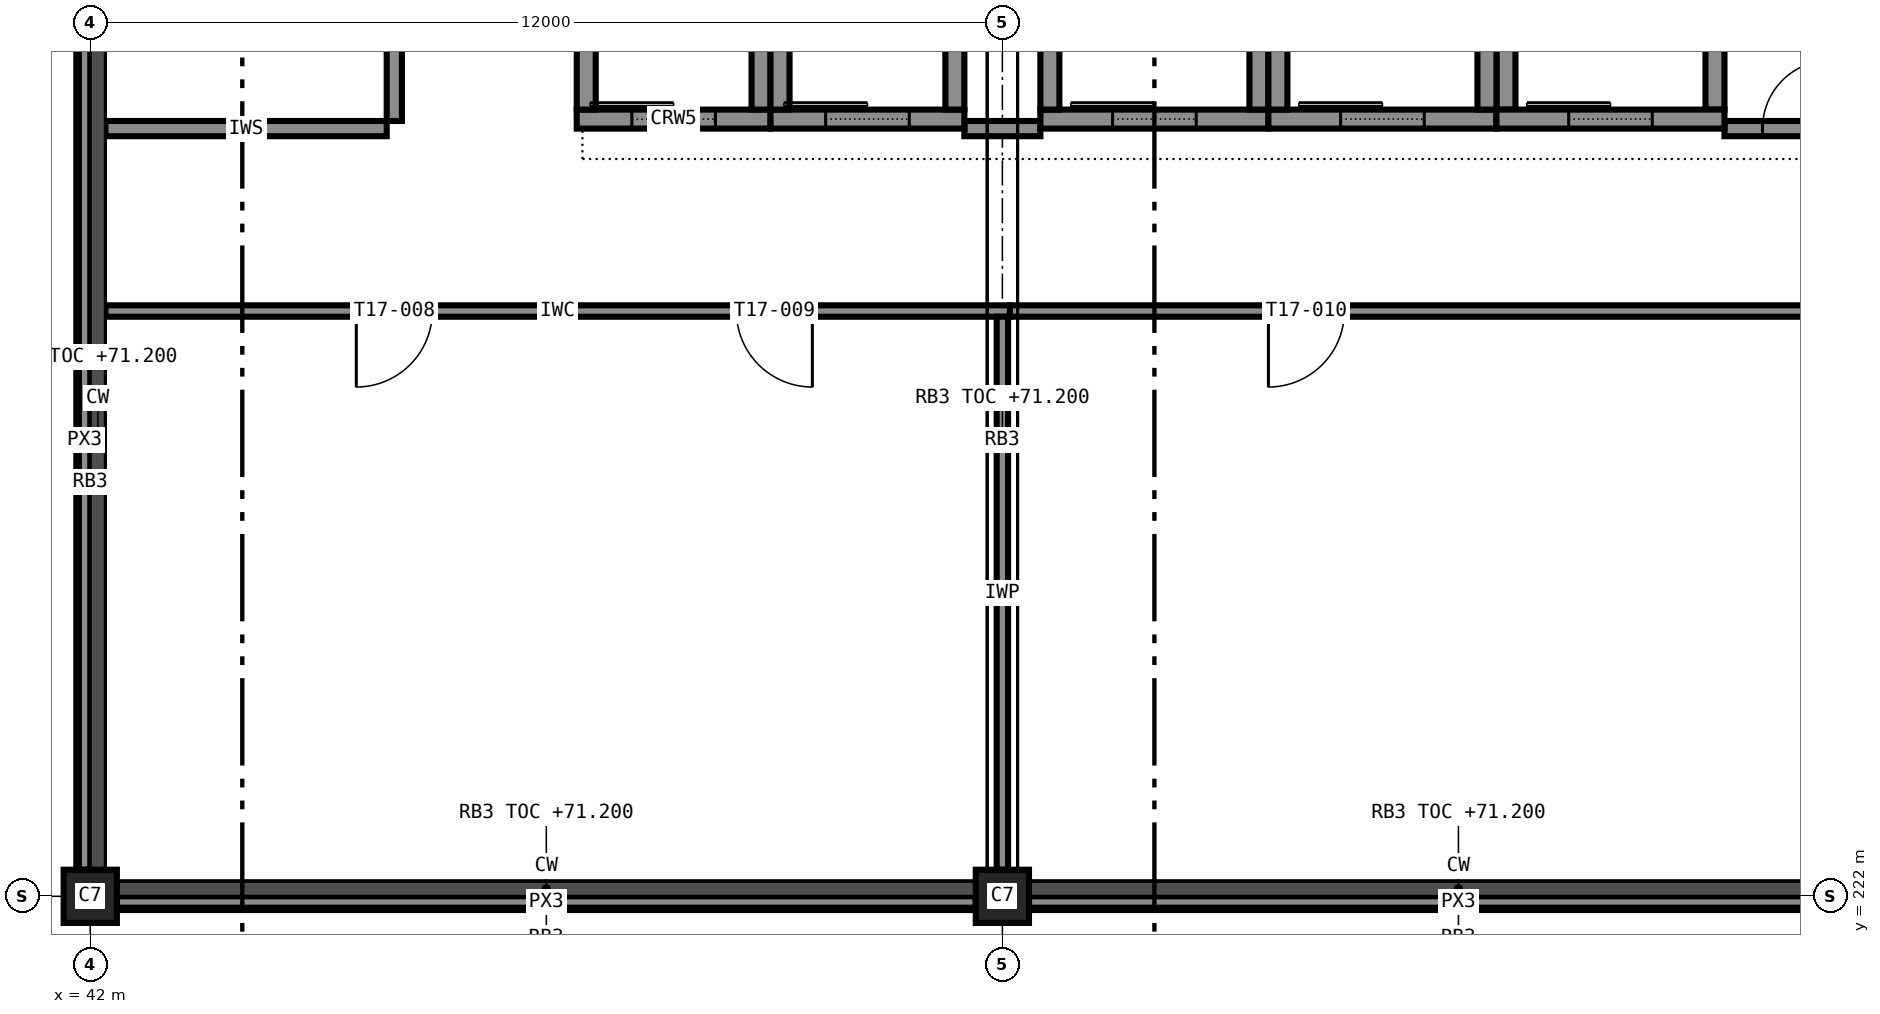
"""IFC4 building model, lengths in metres.
Left out: names, types, materials, properties, quantities, classifications, styles, units other than length and angle.
Written with IfcOpenShell. Run it as: python <this file> out.ifc"""

import sys

from ifc_helpers import new_model, si_unit, direction, frame, frame_2d, origin, origin_2d, place, context, subcontext, project, spatial, rectangle, extrude, element, fill, save


model = new_model("IFC4")
c1 = context("Model", 3, precision=1e-05, world=origin(), true_north=direction((0.0, 1.0)))
c2 = subcontext(c1, "Body", "Model", "MODEL_VIEW")
j1 = project(units=[si_unit("LENGTHUNIT", "METRE"), si_unit("PLANEANGLEUNIT", "RADIAN")], contexts=[c1])
p1 = place(None, origin())
s1 = spatial("IfcSite", under=j1, at=p1, CompositionType="ELEMENT")
p2 = place(p1, origin())
s2 = spatial("IfcBuilding", under=s1, at=p2, CompositionType="ELEMENT")
p3 = place(p2, frame((0.0, 0.0, 67.8)))
s3 = spatial("IfcBuildingStorey", under=s2, at=p3, CompositionType="ELEMENT", Elevation=67.8)
for number, where, z_axis, x_axis in (
    (1, (42.0, 222.0, 0.0), (0.0, 0.0, 1.0), (1.0, 0.0, 0.0)),
    (2, (54.0, 222.0, 0.0), (0.0, 0.0, 1.0), (1.0, 0.0, 0.0)),
):
    element("IfcColumn", number, at=place(p3, frame(where, z_axis=z_axis, x_axis=x_axis)), inside=s3, PredefinedType="COLUMN", context=c2, shape_type="SweptSolid", body=[
        extrude(rectangle(XDim=0.7, YDim=0.7, at=origin_2d()), origin(), (0.0, 0.0, 1.0), 3.6),
    ])
p4 = place(p3, frame((54.5, 232.225, 0.0), z_axis=(0.0, 0.0, 1.0), x_axis=(1.0, 0.0, 0.0)))
e3 = element("IfcWall", 3, at=p4, inside=s3, PredefinedType="SHEAR", context=c2, shape_type="SweptSolid", body=[
    extrude(rectangle(XDim=3.0, YDim=0.25, at=frame_2d((1.5, 0.0))), origin(), (0.0, 0.0, 1.0), 3.6),
])
p5 = place(p4, frame((0.95, 0.0, 0.0)))
e4 = element("IfcOpeningElement", 4, at=p5, cuts=e3, PredefinedType="OPENING", context=c2, shape_type="SweptSolid", body=[
    extrude(rectangle(XDim=1.1, YDim=2.1, at=frame_2d((0.55, 1.05))), frame((0.0, 0.135, 0.0), z_axis=(0.0, -1.0, 0.0), x_axis=(1.0, 0.0, 0.0)), (0.0, 0.0, 1.0), 0.27),
])
for number, where, z_axis, x_axis in (
    (5, (54.625, 232.35, 0.0), (0.0, 0.0, 1.0), (0.0, 1.0, 0.0)),
    (6, (57.375, 232.35, 0.0), (0.0, 0.0, 1.0), (0.0, 1.0, 0.0)),
):
    element("IfcWall", number, at=place(p3, frame(where, z_axis=z_axis, x_axis=x_axis)), inside=s3, PredefinedType="SHEAR", context=c2, shape_type="SweptSolid", body=[
        extrude(rectangle(XDim=3.3, YDim=0.25, at=frame_2d((1.65, 0.0))), origin(), (0.0, 0.0, 1.0), 3.6),
    ])
p6 = place(p3, frame((57.5, 232.225, 0.0), z_axis=(0.0, 0.0, 1.0), x_axis=(1.0, 0.0, 0.0)))
e7 = element("IfcWall", 7, at=p6, inside=s3, PredefinedType="SHEAR", context=c2, shape_type="SweptSolid", body=[
    extrude(rectangle(XDim=3.0, YDim=0.25, at=frame_2d((1.5, 0.0))), origin(), (0.0, 0.0, 1.0), 3.6),
])
p7 = place(p6, frame((0.95, 0.0, 0.0)))
e8 = element("IfcOpeningElement", 8, at=p7, cuts=e7, PredefinedType="OPENING", context=c2, shape_type="SweptSolid", body=[
    extrude(rectangle(XDim=1.1, YDim=2.1, at=frame_2d((0.55, 1.05))), frame((0.0, 0.135, 0.0), z_axis=(0.0, -1.0, 0.0), x_axis=(1.0, 0.0, 0.0)), (0.0, 0.0, 1.0), 0.27),
])
for number, where, z_axis, x_axis in (
    (9, (57.625, 232.35, 0.0), (0.0, 0.0, 1.0), (0.0, 1.0, 0.0)),
    (10, (60.375, 232.35, 0.0), (0.0, 0.0, 1.0), (0.0, 1.0, 0.0)),
):
    element("IfcWall", number, at=place(p3, frame(where, z_axis=z_axis, x_axis=x_axis)), inside=s3, PredefinedType="SHEAR", context=c2, shape_type="SweptSolid", body=[
        extrude(rectangle(XDim=3.3, YDim=0.25, at=frame_2d((1.65, 0.0))), origin(), (0.0, 0.0, 1.0), 3.6),
    ])
p8 = place(p3, frame((60.5, 232.225, 0.0), z_axis=(0.0, 0.0, 1.0), x_axis=(1.0, 0.0, 0.0)))
e11 = element("IfcWall", 11, at=p8, inside=s3, PredefinedType="SHEAR", context=c2, shape_type="SweptSolid", body=[
    extrude(rectangle(XDim=3.0, YDim=0.25, at=frame_2d((1.5, 0.0))), origin(), (0.0, 0.0, 1.0), 3.6),
])
p9 = place(p8, frame((0.95, 0.0, 0.0)))
e12 = element("IfcOpeningElement", 12, at=p9, cuts=e11, PredefinedType="OPENING", context=c2, shape_type="SweptSolid", body=[
    extrude(rectangle(XDim=1.1, YDim=2.1, at=frame_2d((0.55, 1.05))), frame((0.0, 0.135, 0.0), z_axis=(0.0, -1.0, 0.0), x_axis=(1.0, 0.0, 0.0)), (0.0, 0.0, 1.0), 0.27),
])
for number, where, z_axis, x_axis in (
    (13, (60.625, 232.35, 0.0), (0.0, 0.0, 1.0), (0.0, 1.0, 0.0)),
    (14, (63.375, 232.35, 0.0), (0.0, 0.0, 1.0), (0.0, 1.0, 0.0)),
):
    element("IfcWall", number, at=place(p3, frame(where, z_axis=z_axis, x_axis=x_axis)), inside=s3, PredefinedType="SHEAR", context=c2, shape_type="SweptSolid", body=[
        extrude(rectangle(XDim=3.3, YDim=0.25, at=frame_2d((1.65, 0.0))), origin(), (0.0, 0.0, 1.0), 3.6),
    ])
p10 = place(p3, frame((48.4, 232.225, 0.0), z_axis=(0.0, 0.0, 1.0), x_axis=(1.0, 0.0, 0.0)))
e15 = element("IfcWall", 15, at=p10, inside=s3, PredefinedType="SHEAR", context=c2, shape_type="SweptSolid", body=[
    extrude(rectangle(XDim=2.55, YDim=0.25, at=frame_2d((1.275, 0.0))), origin(), (0.0, 0.0, 1.0), 3.6),
])
p11 = place(p10, frame((0.725, 0.0, 0.0)))
e16 = element("IfcOpeningElement", 16, at=p11, cuts=e15, PredefinedType="OPENING", context=c2, shape_type="SweptSolid", body=[
    extrude(rectangle(XDim=1.1, YDim=2.1, at=frame_2d((0.55, 1.05))), frame((0.0, 0.135, 0.0), z_axis=(0.0, -1.0, 0.0), x_axis=(1.0, 0.0, 0.0)), (0.0, 0.0, 1.0), 0.27),
])
for number, where, z_axis, x_axis in (
    (17, (48.525, 232.35, 0.0), (0.0, 0.0, 1.0), (0.0, 1.0, 0.0)),
    (18, (50.825, 232.35, 0.0), (0.0, 0.0, 1.0), (0.0, 1.0, 0.0)),
):
    element("IfcWall", number, at=place(p3, frame(where, z_axis=z_axis, x_axis=x_axis)), inside=s3, PredefinedType="SHEAR", context=c2, shape_type="SweptSolid", body=[
        extrude(rectangle(XDim=3.3, YDim=0.25, at=frame_2d((1.65, 0.0))), origin(), (0.0, 0.0, 1.0), 3.6),
    ])
p12 = place(p3, frame((50.95, 232.225, 0.0), z_axis=(0.0, 0.0, 1.0), x_axis=(1.0, 0.0, 0.0)))
e19 = element("IfcWall", 19, at=p12, inside=s3, PredefinedType="SHEAR", context=c2, shape_type="SweptSolid", body=[
    extrude(rectangle(XDim=2.55, YDim=0.25, at=frame_2d((1.275, 0.0))), origin(), (0.0, 0.0, 1.0), 3.6),
])
p13 = place(p12, frame((0.725, 0.0, 0.0)))
e20 = element("IfcOpeningElement", 20, at=p13, cuts=e19, PredefinedType="OPENING", context=c2, shape_type="SweptSolid", body=[
    extrude(rectangle(XDim=1.1, YDim=2.1, at=frame_2d((0.55, 1.05))), frame((0.0, 0.135, 0.0), z_axis=(0.0, -1.0, 0.0), x_axis=(1.0, 0.0, 0.0)), (0.0, 0.0, 1.0), 0.27),
])
for number, where, z_axis, x_axis in (
    (21, (51.075, 232.35, 0.0), (0.0, 0.0, 1.0), (0.0, 1.0, 0.0)),
    (22, (53.375, 232.35, 0.0), (0.0, 0.0, 1.0), (0.0, 1.0, 0.0)),
):
    element("IfcWall", number, at=place(p3, frame(where, z_axis=z_axis, x_axis=x_axis)), inside=s3, PredefinedType="SHEAR", context=c2, shape_type="SweptSolid", body=[
        extrude(rectangle(XDim=3.3, YDim=0.25, at=frame_2d((1.65, 0.0))), origin(), (0.0, 0.0, 1.0), 3.6),
    ])
for number, where, z_axis, x_axis in (
    (23, (42.35, 221.925, 3.4), (0.0, 0.0, 1.0), (1.0, 0.0, 0.0)),
    (24, (54.35, 221.925, 3.4), (0.0, 0.0, 1.0), (1.0, 0.0, 0.0)),
    (25, (41.925, 233.65, 3.4), (0.0, 0.0, 1.0), (0.0, -1.0, 0.0)),
):
    element("IfcWall", number, at=place(p3, frame(where, z_axis=z_axis, x_axis=x_axis)), inside=s3, PredefinedType="STANDARD", context=c2, shape_type="SweptSolid", body=[
        extrude(rectangle(XDim=11.3, YDim=0.15, at=frame_2d((5.65, 0.0))), origin(), (0.0, 0.0, 1.0), 0.2),
    ])
p14 = place(p3, frame((42.2, 232.1, 0.0), z_axis=(0.0, 0.0, 1.0), x_axis=(1.0, 0.0, 0.0)))
e26 = element("IfcWall", 26, at=p14, inside=s3, PredefinedType="PARTITIONING", context=c2, shape_type="SweptSolid", body=[
    extrude(rectangle(XDim=3.7, YDim=0.2, at=frame_2d((1.85, 0.0))), origin(), (0.0, 0.0, 1.0), 3.4),
])
p15 = place(p3, frame((53.5, 232.1, 0.0), z_axis=(0.0, 0.0, 1.0), x_axis=(1.0, 0.0, 0.0)))
e27 = element("IfcWall", 27, at=p15, inside=s3, PredefinedType="PARTITIONING", context=c2, shape_type="SweptSolid", body=[
    extrude(rectangle(XDim=1.0, YDim=0.2, at=frame_2d((0.5, 0.0))), origin(), (0.0, 0.0, 1.0), 3.4),
])
p16 = place(p3, frame((63.5, 232.1, 0.0), z_axis=(0.0, 0.0, 1.0), x_axis=(1.0, 0.0, 0.0)))
e28 = element("IfcWall", 28, at=p16, inside=s3, PredefinedType="PARTITIONING", context=c2, shape_type="SweptSolid", body=[
    extrude(rectangle(XDim=1.9, YDim=0.2, at=frame_2d((0.95, 0.0))), origin(), (0.0, 0.0, 1.0), 3.4),
])
p17 = place(p16, frame((0.5, 0.0, 0.0)))
e29 = element("IfcOpeningElement", 29, at=p17, cuts=e28, PredefinedType="OPENING", context=c2, shape_type="SweptSolid", body=[
    extrude(rectangle(XDim=0.9, YDim=2.1, at=frame_2d((0.45, 1.05))), frame((0.0, 0.11, 0.0), z_axis=(0.0, -1.0, 0.0), x_axis=(1.0, 0.0, 0.0)), (0.0, 0.0, 1.0), 0.22),
])
p18 = place(p3, frame((46.0, 232.2, 0.0), z_axis=(0.0, 0.0, 1.0), x_axis=(0.0, 1.0, 0.0)))
e30 = element("IfcWall", 30, at=p18, inside=s3, PredefinedType="PARTITIONING", context=c2, shape_type="SweptSolid", body=[
    extrude(rectangle(XDim=3.6, YDim=0.2, at=frame_2d((1.8, 0.0))), origin(), (0.0, 0.0, 1.0), 3.4),
])
p19 = place(p18, frame((1.35, 0.0, 0.0)))
e31 = element("IfcOpeningElement", 31, at=p19, cuts=e30, PredefinedType="OPENING", context=c2, shape_type="SweptSolid", body=[
    extrude(rectangle(XDim=0.9, YDim=2.1, at=frame_2d((0.45, 1.05))), frame((0.0, 0.11, 0.0), z_axis=(0.0, -1.0, 0.0), x_axis=(1.0, 0.0, 0.0)), (0.0, 0.0, 1.0), 0.22),
])
p20 = place(p3, frame((54.1, 229.7, 0.0), z_axis=(0.0, 0.0, 1.0), x_axis=(-1.0, 0.0, 0.0)))
e32 = element("IfcWall", 32, at=p20, inside=s3, PredefinedType="PARTITIONING", context=c2, shape_type="SweptSolid", body=[
    extrude(rectangle(XDim=11.9, YDim=0.15, at=frame_2d((5.95, 0.0))), origin(), (0.0, 0.0, 1.0), 3.4),
])
p21 = place(p20, frame((7.6, 0.0, 0.0)))
e33 = element("IfcOpeningElement", 33, at=p21, cuts=e32, PredefinedType="OPENING", context=c2, shape_type="SweptSolid", body=[
    extrude(rectangle(XDim=1.0, YDim=2.1, at=frame_2d((0.5, 1.05))), frame((0.0, 0.085, 0.0), z_axis=(0.0, -1.0, 0.0), x_axis=(1.0, 0.0, 0.0)), (0.0, 0.0, 1.0), 0.17),
])
p22 = place(p20, frame((2.6, 0.0, 0.0)))
e34 = element("IfcOpeningElement", 34, at=p22, cuts=e32, PredefinedType="OPENING", context=c2, shape_type="SweptSolid", body=[
    extrude(rectangle(XDim=1.0, YDim=2.1, at=frame_2d((0.5, 1.05))), frame((0.0, 0.085, 0.0), z_axis=(0.0, -1.0, 0.0), x_axis=(1.0, 0.0, 0.0)), (0.0, 0.0, 1.0), 0.17),
])
p23 = place(p3, frame((86.0, 229.7, 0.0), z_axis=(0.0, 0.0, 1.0), x_axis=(-1.0, 0.0, 0.0)))
e35 = element("IfcWall", 35, at=p23, inside=s3, PredefinedType="PARTITIONING", context=c2, shape_type="SweptSolid", body=[
    extrude(rectangle(XDim=31.9, YDim=0.15, at=frame_2d((15.95, 0.0))), origin(), (0.0, 0.0, 1.0), 3.4),
])
p24 = place(p23, frame((27.5, 0.0, 0.0)))
e36 = element("IfcOpeningElement", 36, at=p24, cuts=e35, PredefinedType="OPENING", context=c2, shape_type="SweptSolid", body=[
    extrude(rectangle(XDim=1.0, YDim=2.1, at=frame_2d((0.5, 1.05))), frame((0.0, 0.085, 0.0), z_axis=(0.0, -1.0, 0.0), x_axis=(1.0, 0.0, 0.0)), (0.0, 0.0, 1.0), 0.17),
])
p25 = place(p23, frame((15.5, 0.0, 0.0)))
e37 = element("IfcOpeningElement", 37, at=p25, cuts=e35, PredefinedType="OPENING", context=c2, shape_type="SweptSolid", body=[
    extrude(rectangle(XDim=1.0, YDim=2.1, at=frame_2d((0.5, 1.05))), frame((0.0, 0.085, 0.0), z_axis=(0.0, -1.0, 0.0), x_axis=(1.0, 0.0, 0.0)), (0.0, 0.0, 1.0), 0.17),
])
p26 = place(p23, frame((3.5, 0.0, 0.0)))
e38 = element("IfcOpeningElement", 38, at=p26, cuts=e35, PredefinedType="OPENING", context=c2, shape_type="SweptSolid", body=[
    extrude(rectangle(XDim=1.0, YDim=2.1, at=frame_2d((0.5, 1.05))), frame((0.0, 0.085, 0.0), z_axis=(0.0, -1.0, 0.0), x_axis=(1.0, 0.0, 0.0)), (0.0, 0.0, 1.0), 0.17),
])
p27 = place(p3, frame((54.0, 222.35, 0.0), z_axis=(0.0, 0.0, 1.0), x_axis=(0.0, 1.0, 0.0)))
e39 = element("IfcWall", 39, at=p27, inside=s3, PredefinedType="PARTITIONING", context=c2, shape_type="SweptSolid", body=[
    extrude(rectangle(XDim=7.275, YDim=0.15, at=frame_2d((3.637, 0.0))), origin(), (0.0, 0.0, 1.0), 2.6),
])
p28 = place(p17, origin())
e40 = element("IfcDoor", 40, at=p28, inside=s3, OperationType="SINGLE_SWING_RIGHT", PredefinedType="DOOR", context=c2, shape_type="SweptSolid", body=[
    extrude(rectangle(XDim=0.9, YDim=2.1, at=frame_2d((0.45, 1.05))), frame((0.0, 0.025, 0.0), z_axis=(0.0, -1.0, 0.0), x_axis=(1.0, 0.0, 0.0)), (0.0, 0.0, 1.0), 0.05),
])
fill(e29, e40)
p29 = place(p21, origin())
e41 = element("IfcDoor", 41, at=p29, inside=s3, OperationType="SINGLE_SWING_RIGHT", PredefinedType="DOOR", context=c2, shape_type="SweptSolid", body=[
    extrude(rectangle(XDim=1.0, YDim=2.1, at=frame_2d((0.5, 1.05))), frame((0.0, 0.025, 0.0), z_axis=(0.0, -1.0, 0.0), x_axis=(1.0, 0.0, 0.0)), (0.0, 0.0, 1.0), 0.05),
])
fill(e33, e41)
p30 = place(p22, origin())
e42 = element("IfcDoor", 42, at=p30, inside=s3, OperationType="SINGLE_SWING_LEFT", PredefinedType="DOOR", context=c2, shape_type="SweptSolid", body=[
    extrude(rectangle(XDim=1.0, YDim=2.1, at=frame_2d((0.5, 1.05))), frame((0.0, 0.025, 0.0), z_axis=(0.0, -1.0, 0.0), x_axis=(1.0, 0.0, 0.0)), (0.0, 0.0, 1.0), 0.05),
])
fill(e34, e42)
p31 = place(p24, origin())
e43 = element("IfcDoor", 43, at=p31, inside=s3, OperationType="SINGLE_SWING_RIGHT", PredefinedType="DOOR", context=c2, shape_type="SweptSolid", body=[
    extrude(rectangle(XDim=1.0, YDim=2.1, at=frame_2d((0.5, 1.05))), frame((0.0, 0.025, 0.0), z_axis=(0.0, -1.0, 0.0), x_axis=(1.0, 0.0, 0.0)), (0.0, 0.0, 1.0), 0.05),
])
fill(e36, e43)
p32 = place(p5, origin())
e44 = element("IfcDoor", 44, at=p32, inside=s3, OperationType="SLIDING_TO_LEFT", PredefinedType="DOOR", context=c2, shape_type="SweptSolid", body=[
    extrude(rectangle(XDim=1.1, YDim=2.1, at=frame_2d((0.55, 1.05))), frame((0.0, 0.025, 0.0), z_axis=(0.0, -1.0, 0.0), x_axis=(1.0, 0.0, 0.0)), (0.0, 0.0, 1.0), 0.05),
])
fill(e4, e44)
p33 = place(p7, origin())
e45 = element("IfcDoor", 45, at=p33, inside=s3, OperationType="SLIDING_TO_LEFT", PredefinedType="DOOR", context=c2, shape_type="SweptSolid", body=[
    extrude(rectangle(XDim=1.1, YDim=2.1, at=frame_2d((0.55, 1.05))), frame((0.0, 0.025, 0.0), z_axis=(0.0, -1.0, 0.0), x_axis=(1.0, 0.0, 0.0)), (0.0, 0.0, 1.0), 0.05),
])
fill(e8, e45)
p34 = place(p9, origin())
e46 = element("IfcDoor", 46, at=p34, inside=s3, OperationType="SLIDING_TO_LEFT", PredefinedType="DOOR", context=c2, shape_type="SweptSolid", body=[
    extrude(rectangle(XDim=1.1, YDim=2.1, at=frame_2d((0.55, 1.05))), frame((0.0, 0.025, 0.0), z_axis=(0.0, -1.0, 0.0), x_axis=(1.0, 0.0, 0.0)), (0.0, 0.0, 1.0), 0.05),
])
fill(e12, e46)
p35 = place(p11, origin())
e47 = element("IfcDoor", 47, at=p35, inside=s3, OperationType="SLIDING_TO_LEFT", PredefinedType="DOOR", context=c2, shape_type="SweptSolid", body=[
    extrude(rectangle(XDim=1.1, YDim=2.1, at=frame_2d((0.55, 1.05))), frame((0.0, 0.025, 0.0), z_axis=(0.0, -1.0, 0.0), x_axis=(1.0, 0.0, 0.0)), (0.0, 0.0, 1.0), 0.05),
])
fill(e16, e47)
p36 = place(p13, origin())
e48 = element("IfcDoor", 48, at=p36, inside=s3, OperationType="SLIDING_TO_LEFT", PredefinedType="DOOR", context=c2, shape_type="SweptSolid", body=[
    extrude(rectangle(XDim=1.1, YDim=2.1, at=frame_2d((0.55, 1.05))), frame((0.0, 0.025, 0.0), z_axis=(0.0, -1.0, 0.0), x_axis=(1.0, 0.0, 0.0)), (0.0, 0.0, 1.0), 0.05),
])
fill(e20, e48)
save(model, sys.argv[1])
